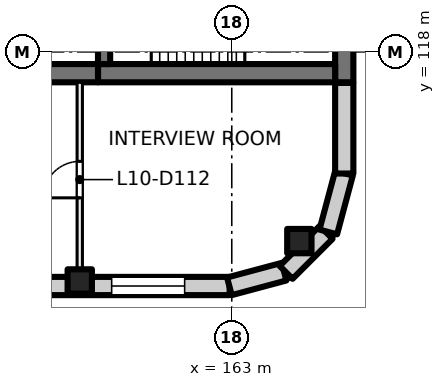
"""IFC4 building model, lengths in metres.
Left out: names, types, materials, properties, quantities, classifications, styles, units other than length and angle.
Written with IfcOpenShell. Run it as: python <this file> out.ifc"""

import sys

from ifc_helpers import new_model, si_unit, direction, frame, frame_2d, origin, origin_2d, place, context, subcontext, project, spatial, rectangle, extrude, element, fill, save


model = new_model("IFC4")
c1 = context("Model", 3, precision=1e-05, world=origin(), true_north=direction((0.0, 1.0)))
c2 = subcontext(c1, "Body", "Model", "MODEL_VIEW")
j1 = project(units=[si_unit("LENGTHUNIT", "METRE"), si_unit("PLANEANGLEUNIT", "RADIAN")], contexts=[c1])
p1 = place(None, origin())
s1 = spatial("IfcSite", under=j1, at=p1, CompositionType="ELEMENT")
p2 = place(p1, origin())
s2 = spatial("IfcBuilding", under=s1, at=p2, CompositionType="ELEMENT")
p3 = place(p2, frame((0.0, 0.0, 47.5)))
s3 = spatial("IfcBuildingStorey", under=s2, at=p3, CompositionType="ELEMENT", Elevation=47.5)
for number, where, z_axis, x_axis in (
    (1, (165.223, 111.777, 0.0), (0.0, 0.0, 1.0), (1.0, 0.0, 0.0)),
    (2, (158.0, 110.45, 0.0), (0.0, 0.0, 1.0), (1.0, 0.0, 0.0)),
):
    element("IfcColumn", number, at=place(p3, frame(where, z_axis=z_axis, x_axis=x_axis)), inside=s3, PredefinedType="COLUMN", context=c2, shape_type="SweptSolid", body=[
        extrude(rectangle(XDim=0.8, YDim=0.8, at=origin_2d()), origin(), (0.0, 0.0, 1.0), 4.0),
    ])
p4 = place(p3, frame((166.7, 120.8, 0.0), z_axis=(0.0, 0.0, 1.0), x_axis=(0.0, -1.0, 0.0)))
e3 = element("IfcWall", 3, at=p4, inside=s3, PredefinedType="SHEAR", context=c2, shape_type="SweptSolid", body=[
    extrude(rectangle(XDim=3.8, YDim=0.6, at=frame_2d((1.9, 0.0))), origin(), (0.0, 0.0, 1.0), 4.0),
])
p5 = place(p3, frame((166.4, 117.3, 0.0), z_axis=(0.0, 0.0, 1.0), x_axis=(-1.0, 0.0, 0.0)))
e4 = element("IfcWall", 4, at=p5, inside=s3, PredefinedType="SHEAR", context=c2, shape_type="SweptSolid", body=[
    extrude(rectangle(XDim=7.8, YDim=0.6, at=frame_2d((3.9, 0.0))), origin(), (0.0, 0.0, 1.0), 4.0),
])
p6 = place(p3, frame((158.6, 117.3, 0.0), z_axis=(0.0, 0.0, 1.0), x_axis=(-1.0, 0.0, 0.0)))
e5 = element("IfcWall", 5, at=p6, inside=s3, PredefinedType="SHEAR", context=c2, shape_type="SweptSolid", body=[
    extrude(rectangle(XDim=4.6, YDim=0.6, at=frame_2d((2.3, 0.0))), origin(), (0.0, 0.0, 1.0), 4.0),
])
p7 = place(p3, frame((158.8, 120.4, 0.0), z_axis=(0.0, 0.0, 1.0), x_axis=(0.0, -1.0, 0.0)))
e6 = element("IfcWall", 6, at=p7, inside=s3, PredefinedType="SHEAR", context=c2, shape_type="SweptSolid", body=[
    extrude(rectangle(XDim=2.8, YDim=0.4, at=frame_2d((1.4, 0.0))), origin(), (0.0, 0.0, 1.0), 4.0),
])
p8 = place(p7, frame((0.9, 0.0, 0.0)))
e7 = element("IfcOpeningElement", 7, at=p8, cuts=e6, PredefinedType="OPENING", context=c2, shape_type="SweptSolid", body=[
    extrude(rectangle(XDim=1.0, YDim=2.1, at=frame_2d((0.5, 1.05))), frame((0.0, 0.21, 0.0), z_axis=(0.0, -1.0, 0.0), x_axis=(1.0, 0.0, 0.0)), (0.0, 0.0, 1.0), 0.42),
])
p9 = place(p3, frame((162.93, 110.3, 0.0), z_axis=(0.0, 0.0, 1.0), x_axis=(-1.0, 0.0, 0.0)))
e8 = element("IfcWall", 8, at=p9, inside=s3, PredefinedType="SOLIDWALL", context=c2, shape_type="SweptSolid", body=[
    extrude(rectangle(XDim=31.93, YDim=0.6, at=frame_2d((15.965, 0.0))), origin(), (0.0, 0.0, 1.0), 3.625),
])
p10 = place(p9, frame((1.48, 0.0, 0.9)))
e9 = element("IfcOpeningElement", 9, at=p10, cuts=e8, PredefinedType="OPENING", context=c2, shape_type="SweptSolid", body=[
    extrude(rectangle(XDim=2.4, YDim=2.4, at=frame_2d((1.2, 1.2))), frame((0.0, 0.31, 0.0), z_axis=(0.0, -1.0, 0.0), x_axis=(1.0, 0.0, 0.0)), (0.0, 0.0, 1.0), 0.62),
])
p11 = place(p9, frame((5.98, 0.0, 0.9)))
e10 = element("IfcOpeningElement", 10, at=p11, cuts=e8, PredefinedType="OPENING", context=c2, shape_type="SweptSolid", body=[
    extrude(rectangle(XDim=2.4, YDim=2.4, at=frame_2d((1.2, 1.2))), frame((0.0, 0.31, 0.0), z_axis=(0.0, -1.0, 0.0), x_axis=(1.0, 0.0, 0.0)), (0.0, 0.0, 1.0), 0.62),
])
p12 = place(p9, frame((10.48, 0.0, 0.9)))
e11 = element("IfcOpeningElement", 11, at=p12, cuts=e8, PredefinedType="OPENING", context=c2, shape_type="SweptSolid", body=[
    extrude(rectangle(XDim=2.4, YDim=2.4, at=frame_2d((1.2, 1.2))), frame((0.0, 0.31, 0.0), z_axis=(0.0, -1.0, 0.0), x_axis=(1.0, 0.0, 0.0)), (0.0, 0.0, 1.0), 0.62),
])
p13 = place(p9, frame((14.98, 0.0, 0.9)))
e12 = element("IfcOpeningElement", 12, at=p13, cuts=e8, PredefinedType="OPENING", context=c2, shape_type="SweptSolid", body=[
    extrude(rectangle(XDim=2.4, YDim=2.4, at=frame_2d((1.2, 1.2))), frame((0.0, 0.31, 0.0), z_axis=(0.0, -1.0, 0.0), x_axis=(1.0, 0.0, 0.0)), (0.0, 0.0, 1.0), 0.62),
])
p14 = place(p9, frame((19.48, 0.0, 0.9)))
e13 = element("IfcOpeningElement", 13, at=p14, cuts=e8, PredefinedType="OPENING", context=c2, shape_type="SweptSolid", body=[
    extrude(rectangle(XDim=2.4, YDim=2.4, at=frame_2d((1.2, 1.2))), frame((0.0, 0.31, 0.0), z_axis=(0.0, -1.0, 0.0), x_axis=(1.0, 0.0, 0.0)), (0.0, 0.0, 1.0), 0.62),
])
p15 = place(p9, frame((23.98, 0.0, 0.9)))
e14 = element("IfcOpeningElement", 14, at=p15, cuts=e8, PredefinedType="OPENING", context=c2, shape_type="SweptSolid", body=[
    extrude(rectangle(XDim=2.4, YDim=2.4, at=frame_2d((1.2, 1.2))), frame((0.0, 0.31, 0.0), z_axis=(0.0, -1.0, 0.0), x_axis=(1.0, 0.0, 0.0)), (0.0, 0.0, 1.0), 0.62),
])
p16 = place(p9, frame((28.48, 0.0, 0.9)))
e15 = element("IfcOpeningElement", 15, at=p16, cuts=e8, PredefinedType="OPENING", context=c2, shape_type="SweptSolid", body=[
    extrude(rectangle(XDim=2.4, YDim=2.4, at=frame_2d((1.2, 1.2))), frame((0.0, 0.31, 0.0), z_axis=(0.0, -1.0, 0.0), x_axis=(1.0, 0.0, 0.0)), (0.0, 0.0, 1.0), 0.62),
])
for number, where, z_axis, x_axis in (
    (16, (164.719, 110.771, 0.0), (0.0, 0.0, 1.0), (-0.966, -0.259, 0.0)),
    (17, (166.104, 112.064, 0.0), (0.0, 0.0, 1.0), (-0.707, -0.707, 0.0)),
):
    element("IfcWall", number, at=place(p3, frame(where, z_axis=z_axis, x_axis=x_axis)), inside=s3, PredefinedType="SOLIDWALL", context=c2, shape_type="SweptSolid", body=[
        extrude(rectangle(XDim=1.861, YDim=0.6, at=frame_2d((0.93, 0.0))), origin(), (0.0, 0.0, 1.0), 3.625),
    ])
p17 = place(p3, frame((166.692, 114.01, 0.0), z_axis=(0.0, 0.0, 1.0), x_axis=(-0.258839784042, -0.965920269068, 0.0)))
e18 = element("IfcWall", 18, at=p17, inside=s3, PredefinedType="SOLIDWALL", context=c2, shape_type="SweptSolid", body=[
    extrude(rectangle(XDim=2.0, YDim=0.6, at=frame_2d((1.0, 0.0))), origin(), (0.0, 0.0, 1.0), 3.625),
])
p18 = place(p3, frame((166.7, 116.98, 0.0), z_axis=(0.0, 0.0, 1.0), x_axis=(0.0, -1.0, 0.0)))
e19 = element("IfcWall", 19, at=p18, inside=s3, PredefinedType="SOLIDWALL", context=c2, shape_type="SweptSolid", body=[
    extrude(rectangle(XDim=2.98, YDim=0.6, at=frame_2d((1.49, 0.0))), origin(), (0.0, 0.0, 1.0), 3.625),
])
p19 = place(p3, frame((158.0, 110.6, 0.0), z_axis=(0.0, 0.0, 1.0), x_axis=(0.0, 1.0, 0.0)))
e20 = element("IfcWall", 20, at=p19, inside=s3, PredefinedType="PARTITIONING", context=c2, shape_type="SweptSolid", body=[
    extrude(rectangle(XDim=6.4, YDim=0.175, at=frame_2d((3.2, 0.0))), origin(), (0.0, 0.0, 1.0), 3.625),
])
p20 = place(p19, frame((2.6, 0.0, 0.0)))
e21 = element("IfcOpeningElement", 21, at=p20, cuts=e20, PredefinedType="OPENING", context=c2, shape_type="SweptSolid", body=[
    extrude(rectangle(XDim=1.2, YDim=2.1, at=frame_2d((0.6, 1.05))), frame((0.0, 0.097, 0.0), z_axis=(0.0, -1.0, 0.0), x_axis=(1.0, 0.0, 0.0)), (0.0, 0.0, 1.0), 0.195),
])
p21 = place(p10, origin())
e22 = element("IfcWindow", 22, at=p21, inside=s3, PartitioningType="SINGLE_PANEL", PredefinedType="WINDOW", context=c2, shape_type="SweptSolid", body=[
    extrude(rectangle(XDim=2.4, YDim=2.4, at=frame_2d((1.2, 1.2))), frame((0.0, 0.03, 0.0), z_axis=(0.0, -1.0, 0.0), x_axis=(1.0, 0.0, 0.0)), (0.0, 0.0, 1.0), 0.06),
])
fill(e9, e22)
p22 = place(p20, origin())
e23 = element("IfcDoor", 23, at=p22, inside=s3, OperationType="DOUBLE_DOOR_SINGLE_SWING", PredefinedType="DOOR", context=c2, shape_type="SweptSolid", body=[
    extrude(rectangle(XDim=1.2, YDim=2.1, at=frame_2d((0.6, 1.05))), frame((0.0, 0.025, 0.0), z_axis=(0.0, -1.0, 0.0), x_axis=(1.0, 0.0, 0.0)), (0.0, 0.0, 1.0), 0.05),
])
fill(e21, e23)
save(model, sys.argv[1])
